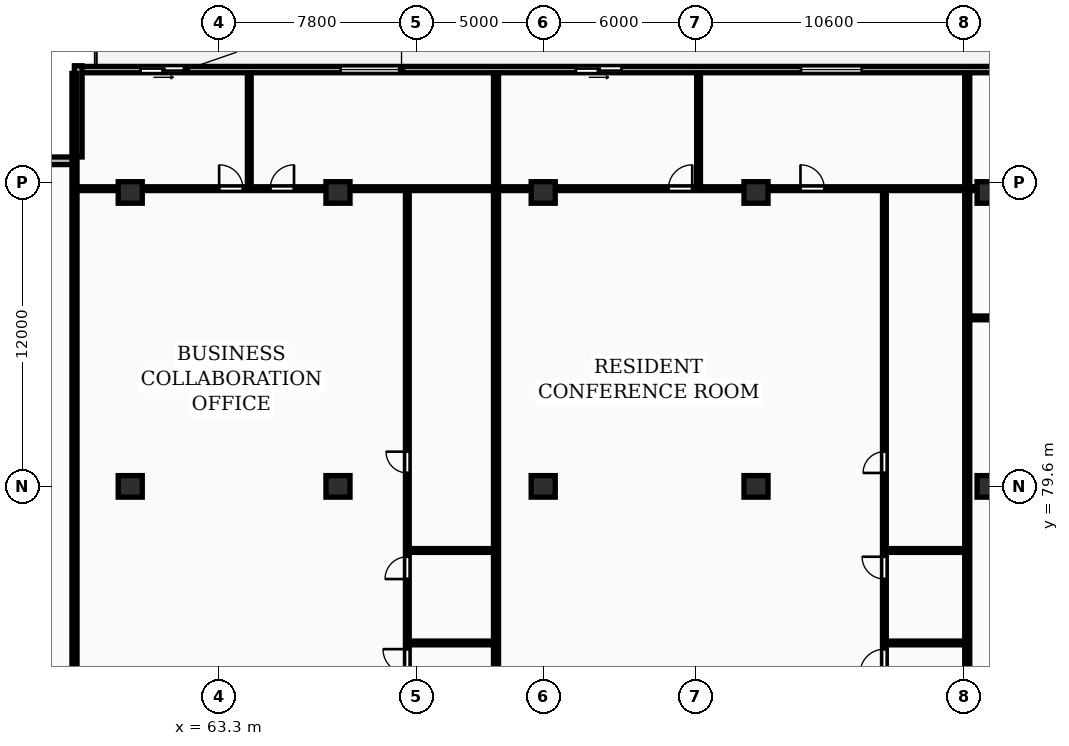
"""IFC4 building model, lengths in metres.
Left out: names, types, materials, properties, quantities, classifications, styles, units other than length and angle.
Written with IfcOpenShell. Run it as: python <this file> out.ifc"""

import sys

from ifc_helpers import new_model, si_unit, direction, frame, frame_2d, origin, origin_2d, place, context, subcontext, project, spatial, rectangle, extrude, element, fill, save


model = new_model("IFC4")
c1 = context("Model", 3, precision=1e-05, world=origin(), true_north=direction((0.0, 1.0)))
c2 = subcontext(c1, "Body", "Model", "MODEL_VIEW")
j1 = project(units=[si_unit("LENGTHUNIT", "METRE"), si_unit("PLANEANGLEUNIT", "RADIAN")], contexts=[c1])
p1 = place(None, origin())
s1 = spatial("IfcSite", under=j1, at=p1, CompositionType="ELEMENT")
p2 = place(p1, origin())
s2 = spatial("IfcBuilding", under=s1, at=p2, CompositionType="ELEMENT")
p3 = place(p2, frame((0.0, 0.0, 132.8)))
s3 = spatial("IfcBuildingStorey", under=s2, at=p3, CompositionType="ELEMENT", Elevation=132.8)
for number, where, z_axis, x_axis in (
    (1, (59.8, 79.6, 0.0), (0.0, 0.0, 1.0), (1.0, 0.0, 0.0)),
    (2, (59.8, 91.2, 0.0), (0.0, 0.0, 1.0), (1.0, 0.0, 0.0)),
    (3, (68.0, 79.6, 0.0), (0.0, 0.0, 1.0), (1.0, 0.0, 0.0)),
    (4, (68.0, 91.2, 0.0), (0.0, 0.0, 1.0), (1.0, 0.0, 0.0)),
    (5, (76.1, 79.6, 0.0), (0.0, 0.0, 1.0), (1.0, 0.0, 0.0)),
    (6, (76.1, 91.2, 0.0), (0.0, 0.0, 1.0), (1.0, 0.0, 0.0)),
    (7, (84.5, 79.6, 0.0), (0.0, 0.0, 1.0), (1.0, 0.0, 0.0)),
    (8, (84.5, 91.2, 0.0), (0.0, 0.0, 1.0), (1.0, 0.0, 0.0)),
    (9, (93.7, 79.6, 0.0), (0.0, 0.0, 1.0), (1.0, 0.0, 0.0)),
    (10, (93.7, 91.2, 0.0), (0.0, 0.0, 1.0), (1.0, 0.0, 0.0)),
):
    element("IfcColumn", number, at=place(p3, frame(where, z_axis=z_axis, x_axis=x_axis)), inside=s3, PredefinedType="COLUMN", context=c2, shape_type="SweptSolid", body=[
        extrude(rectangle(XDim=0.95, YDim=0.85, at=origin_2d()), origin(), (0.0, 0.0, 1.0), 3.25),
    ])
p4 = place(p3, frame((130.6, 96.05, 0.0), z_axis=(0.0, 0.0, 1.0), x_axis=(-1.0, 0.0, 0.0)))
e11 = element("IfcWall", 11, at=p4, inside=s3, PredefinedType="STANDARD", context=c2, shape_type="SweptSolid", body=[
    extrude(rectangle(XDim=73.0, YDim=0.25, at=frame_2d((36.5, 0.0))), origin(), (0.0, 0.0, 1.0), 2.97),
])
p5 = place(p4, frame((68.591, 0.0, 0.0)))
e12 = element("IfcOpeningElement", 12, at=p5, cuts=e11, PredefinedType="OPENING", context=c2, shape_type="SweptSolid", body=[
    extrude(rectangle(XDim=1.8, YDim=2.2, at=frame_2d((0.9, 1.1))), frame((0.0, 0.135, 0.0), z_axis=(0.0, -1.0, 0.0), x_axis=(1.0, 0.0, 0.0)), (0.0, 0.0, 1.0), 0.27),
])
p6 = place(p4, frame((60.092, 0.0, 0.85)))
e13 = element("IfcOpeningElement", 13, at=p6, cuts=e11, PredefinedType="OPENING", context=c2, shape_type="SweptSolid", body=[
    extrude(rectangle(XDim=2.4, YDim=1.9, at=frame_2d((1.2, 0.95))), frame((0.0, 0.135, 0.0), z_axis=(0.0, -1.0, 0.0), x_axis=(1.0, 0.0, 0.0)), (0.0, 0.0, 1.0), 0.27),
])
p7 = place(p4, frame((51.405, 0.0, 0.0)))
e14 = element("IfcOpeningElement", 14, at=p7, cuts=e11, PredefinedType="OPENING", context=c2, shape_type="SweptSolid", body=[
    extrude(rectangle(XDim=1.8, YDim=2.2, at=frame_2d((0.9, 1.1))), frame((0.0, 0.135, 0.0), z_axis=(0.0, -1.0, 0.0), x_axis=(1.0, 0.0, 0.0)), (0.0, 0.0, 1.0), 0.27),
])
p8 = place(p4, frame((41.925, 0.0, 0.85)))
e15 = element("IfcOpeningElement", 15, at=p8, cuts=e11, PredefinedType="OPENING", context=c2, shape_type="SweptSolid", body=[
    extrude(rectangle(XDim=2.4, YDim=1.9, at=frame_2d((1.2, 0.95))), frame((0.0, 0.135, 0.0), z_axis=(0.0, -1.0, 0.0), x_axis=(1.0, 0.0, 0.0)), (0.0, 0.0, 1.0), 0.27),
])
p9 = place(p4, frame((29.296, 0.0, 0.85)))
e16 = element("IfcOpeningElement", 16, at=p9, cuts=e11, PredefinedType="OPENING", context=c2, shape_type="SweptSolid", body=[
    extrude(rectangle(XDim=2.4, YDim=1.9, at=frame_2d((1.2, 0.95))), frame((0.0, 0.135, 0.0), z_axis=(0.0, -1.0, 0.0), x_axis=(1.0, 0.0, 0.0)), (0.0, 0.0, 1.0), 0.27),
])
p10 = place(p4, frame((23.502, 0.0, 0.85)))
e17 = element("IfcOpeningElement", 17, at=p10, cuts=e11, PredefinedType="OPENING", context=c2, shape_type="SweptSolid", body=[
    extrude(rectangle(XDim=2.4, YDim=1.9, at=frame_2d((1.2, 0.95))), frame((0.0, 0.135, 0.0), z_axis=(0.0, -1.0, 0.0), x_axis=(1.0, 0.0, 0.0)), (0.0, 0.0, 1.0), 0.27),
])
p11 = place(p4, frame((34.617, 0.0, 0.0)))
e18 = element("IfcOpeningElement", 18, at=p11, cuts=e11, PredefinedType="OPENING", context=c2, shape_type="SweptSolid", body=[
    extrude(rectangle(XDim=1.8, YDim=2.2, at=frame_2d((0.9, 1.1))), frame((0.0, 0.135, 0.0), z_axis=(0.0, -1.0, 0.0), x_axis=(1.0, 0.0, 0.0)), (0.0, 0.0, 1.0), 0.27),
])
p12 = place(p4, frame((18.5, 0.0, 0.85)))
e19 = element("IfcOpeningElement", 19, at=p12, cuts=e11, PredefinedType="OPENING", context=c2, shape_type="SweptSolid", body=[
    extrude(rectangle(XDim=2.4, YDim=1.9, at=frame_2d((1.2, 0.95))), frame((0.0, 0.135, 0.0), z_axis=(0.0, -1.0, 0.0), x_axis=(1.0, 0.0, 0.0)), (0.0, 0.0, 1.0), 0.27),
])
p13 = place(p4, frame((9.458, 0.0, 0.85)))
e20 = element("IfcOpeningElement", 20, at=p13, cuts=e11, PredefinedType="OPENING", context=c2, shape_type="SweptSolid", body=[
    extrude(rectangle(XDim=2.4, YDim=1.9, at=frame_2d((1.2, 0.95))), frame((0.0, 0.135, 0.0), z_axis=(0.0, -1.0, 0.0), x_axis=(1.0, 0.0, 0.0)), (0.0, 0.0, 1.0), 0.27),
])
p14 = place(p4, frame((5.695, 0.0, 0.85)))
e21 = element("IfcOpeningElement", 21, at=p14, cuts=e11, PredefinedType="OPENING", context=c2, shape_type="SweptSolid", body=[
    extrude(rectangle(XDim=1.8, YDim=1.8, at=frame_2d((0.9, 0.9))), frame((0.0, 0.135, 0.0), z_axis=(0.0, -1.0, 0.0), x_axis=(1.0, 0.0, 0.0)), (0.0, 0.0, 1.0), 0.27),
])
p15 = place(p4, frame((14.225, 0.0, 0.0)))
e22 = element("IfcOpeningElement", 22, at=p15, cuts=e11, PredefinedType="OPENING", context=c2, shape_type="SweptSolid", body=[
    extrude(rectangle(XDim=1.8, YDim=2.2, at=frame_2d((0.9, 1.1))), frame((0.0, 0.135, 0.0), z_axis=(0.0, -1.0, 0.0), x_axis=(1.0, 0.0, 0.0)), (0.0, 0.0, 1.0), 0.27),
])
p16 = place(p4, frame((1.245, 0.0, 0.85)))
e23 = element("IfcOpeningElement", 23, at=p16, cuts=e11, PredefinedType="OPENING", context=c2, shape_type="SweptSolid", body=[
    extrude(rectangle(XDim=2.4, YDim=1.9, at=frame_2d((1.2, 0.95))), frame((0.0, 0.135, 0.0), z_axis=(0.0, -1.0, 0.0), x_axis=(1.0, 0.0, 0.0)), (0.0, 0.0, 1.0), 0.27),
])
p17 = place(p3, frame((57.75, 96.2, 0.0), z_axis=(0.0, 0.0, 1.0), x_axis=(0.0, -1.0, 0.0)))
e24 = element("IfcWall", 24, at=p17, inside=s3, PredefinedType="STANDARD", context=c2, shape_type="SweptSolid", body=[
    extrude(rectangle(XDim=3.6, YDim=0.3, at=frame_2d((1.8, 0.0))), origin(), (0.0, 0.0, 1.0), 2.97),
])
p18 = place(p3, frame((57.6, 92.45, 0.0), z_axis=(0.0, 0.0, 1.0), x_axis=(-1.0, 0.0, 0.0)))
e25 = element("IfcWall", 25, at=p18, inside=s3, PredefinedType="STANDARD", context=c2, shape_type="SweptSolid", body=[
    extrude(rectangle(XDim=3.6, YDim=0.3, at=frame_2d((1.8, 0.0))), origin(), (0.0, 0.0, 1.0), 2.97),
])
for number, where, z_axis, x_axis in (
    (26, (57.6, 69.83, 0.0), (0.0, 0.0, 1.0), (0.0, 1.0, 0.0)),
    (27, (74.238, 69.83, 0.0), (0.0, 0.0, 1.0), (0.0, 1.0, 0.0)),
):
    element("IfcWall", number, at=place(p3, frame(where, z_axis=z_axis, x_axis=x_axis)), inside=s3, PredefinedType="PARTITIONING", context=c2, shape_type="SweptSolid", body=[
        extrude(rectangle(XDim=26.07, YDim=0.2, at=frame_2d((13.035, 0.0))), origin(), (0.0, 0.0, 1.0), 2.97),
    ])
for number, where, z_axis, x_axis in (
    (28, (70.798, 73.42, 0.0), (0.0, 0.0, 1.0), (1.0, 0.0, 0.0)),
    (29, (70.798, 77.07, 0.0), (0.0, 0.0, 1.0), (1.0, 0.0, 0.0)),
):
    element("IfcWall", number, at=place(p3, frame(where, z_axis=z_axis, x_axis=x_axis)), inside=s3, PredefinedType="PARTITIONING", context=c2, shape_type="SweptSolid", body=[
        extrude(rectangle(XDim=3.36, YDim=0.15, at=frame_2d((1.68, 0.0))), origin(), (0.0, 0.0, 1.0), 2.97),
    ])
p19 = place(p3, frame((70.738, 69.81, 0.0), z_axis=(0.0, 0.0, 1.0), x_axis=(0.0, 1.0, 0.0)))
e30 = element("IfcWall", 30, at=p19, inside=s3, PredefinedType="PARTITIONING", context=c2, shape_type="SweptSolid", body=[
    extrude(rectangle(XDim=21.48, YDim=0.15, at=frame_2d((10.74, 0.0))), origin(), (0.0, 0.0, 1.0), 2.97),
])
p20 = place(p19, frame((2.406, 0.0, 0.0)))
e31 = element("IfcOpeningElement", 31, at=p20, cuts=e30, PredefinedType="OPENING", context=c2, shape_type="SweptSolid", body=[
    extrude(rectangle(XDim=0.96, YDim=2.1, at=frame_2d((0.48, 1.05))), frame((0.0, 0.085, 0.0), z_axis=(0.0, -1.0, 0.0), x_axis=(1.0, 0.0, 0.0)), (0.0, 0.0, 1.0), 0.17),
])
p21 = place(p19, frame((6.133, 0.0, 0.0)))
e32 = element("IfcOpeningElement", 32, at=p21, cuts=e30, PredefinedType="OPENING", context=c2, shape_type="SweptSolid", body=[
    extrude(rectangle(XDim=0.88, YDim=2.06, at=frame_2d((0.44, 1.03))), frame((0.0, 0.085, 0.0), z_axis=(0.0, -1.0, 0.0), x_axis=(1.0, 0.0, 0.0)), (0.0, 0.0, 1.0), 0.17),
])
p22 = place(p19, frame((10.32, 0.0, 0.0)))
e33 = element("IfcOpeningElement", 33, at=p22, cuts=e30, PredefinedType="OPENING", context=c2, shape_type="SweptSolid", body=[
    extrude(rectangle(XDim=0.84, YDim=2.04, at=frame_2d((0.42, 1.02))), frame((0.0, 0.085, 0.0), z_axis=(0.0, -1.0, 0.0), x_axis=(1.0, 0.0, 0.0)), (0.0, 0.0, 1.0), 0.17),
])
p23 = place(p3, frame((64.499, 91.43, 0.0), z_axis=(0.0, 0.0, 1.0), x_axis=(0.0, 1.0, 0.0)))
e34 = element("IfcWall", 34, at=p23, inside=s3, PredefinedType="PARTITIONING", context=c2, shape_type="SweptSolid", body=[
    extrude(rectangle(XDim=4.47, YDim=0.15, at=frame_2d((2.235, 0.0))), origin(), (0.0, 0.0, 1.0), 2.97),
])
p24 = place(p3, frame((57.68, 91.35, 0.0), z_axis=(0.0, 0.0, 1.0), x_axis=(1.0, 0.0, 0.0)))
e35 = element("IfcWall", 35, at=p24, inside=s3, PredefinedType="PARTITIONING", context=c2, shape_type="SweptSolid", body=[
    extrude(rectangle(XDim=16.478, YDim=0.15, at=frame_2d((8.239, 0.0))), origin(), (0.0, 0.0, 1.0), 2.663),
])
p25 = place(p24, frame((5.629, 0.0, 0.0)))
e36 = element("IfcOpeningElement", 36, at=p25, cuts=e35, PredefinedType="OPENING", context=c2, shape_type="SweptSolid", body=[
    extrude(rectangle(XDim=0.94, YDim=2.1, at=frame_2d((0.47, 1.05))), frame((0.0, 0.085, 0.0), z_axis=(0.0, -1.0, 0.0), x_axis=(1.0, 0.0, 0.0)), (0.0, 0.0, 1.0), 0.17),
])
p26 = place(p24, frame((7.645, 0.0, 0.0)))
e37 = element("IfcOpeningElement", 37, at=p26, cuts=e35, PredefinedType="OPENING", context=c2, shape_type="SweptSolid", body=[
    extrude(rectangle(XDim=0.94, YDim=2.1, at=frame_2d((0.47, 1.05))), frame((0.0, 0.085, 0.0), z_axis=(0.0, -1.0, 0.0), x_axis=(1.0, 0.0, 0.0)), (0.0, 0.0, 1.0), 0.17),
])
p27 = place(p3, frame((92.837, 69.83, 0.0), z_axis=(0.0, 0.0, 1.0), x_axis=(0.0, 1.0, 0.0)))
e38 = element("IfcWall", 38, at=p27, inside=s3, PredefinedType="PARTITIONING", context=c2, shape_type="SweptSolid", body=[
    extrude(rectangle(XDim=26.07, YDim=0.2, at=frame_2d((13.035, 0.0))), origin(), (0.0, 0.0, 1.0), 2.97),
])
for number, where, z_axis, x_axis in (
    (39, (89.627, 73.42, 0.0), (0.0, 0.0, 1.0), (1.0, 0.0, 0.0)),
    (40, (89.627, 77.07, 0.0), (0.0, 0.0, 1.0), (1.0, 0.0, 0.0)),
):
    element("IfcWall", number, at=place(p3, frame(where, z_axis=z_axis, x_axis=x_axis)), inside=s3, PredefinedType="PARTITIONING", context=c2, shape_type="SweptSolid", body=[
        extrude(rectangle(XDim=3.13, YDim=0.15, at=frame_2d((1.565, 0.0))), origin(), (0.0, 0.0, 1.0), 2.97),
    ])
p28 = place(p3, frame((89.567, 69.81, 0.0), z_axis=(0.0, 0.0, 1.0), x_axis=(0.0, 1.0, 0.0)))
e41 = element("IfcWall", 41, at=p28, inside=s3, PredefinedType="PARTITIONING", context=c2, shape_type="SweptSolid", body=[
    extrude(rectangle(XDim=21.48, YDim=0.15, at=frame_2d((10.74, 0.0))), origin(), (0.0, 0.0, 1.0), 2.97),
])
p29 = place(p28, frame((2.406, 0.0, 0.0)))
e42 = element("IfcOpeningElement", 42, at=p29, cuts=e41, PredefinedType="OPENING", context=c2, shape_type="SweptSolid", body=[
    extrude(rectangle(XDim=0.96, YDim=2.1, at=frame_2d((0.48, 1.05))), frame((0.0, 0.085, 0.0), z_axis=(0.0, -1.0, 0.0), x_axis=(1.0, 0.0, 0.0)), (0.0, 0.0, 1.0), 0.17),
])
p30 = place(p28, frame((6.133, 0.0, 0.0)))
e43 = element("IfcOpeningElement", 43, at=p30, cuts=e41, PredefinedType="OPENING", context=c2, shape_type="SweptSolid", body=[
    extrude(rectangle(XDim=0.88, YDim=2.06, at=frame_2d((0.44, 1.03))), frame((0.0, 0.085, 0.0), z_axis=(0.0, -1.0, 0.0), x_axis=(1.0, 0.0, 0.0)), (0.0, 0.0, 1.0), 0.17),
])
p31 = place(p28, frame((10.32, 0.0, 0.0)))
e44 = element("IfcOpeningElement", 44, at=p31, cuts=e41, PredefinedType="OPENING", context=c2, shape_type="SweptSolid", body=[
    extrude(rectangle(XDim=0.84, YDim=2.04, at=frame_2d((0.42, 1.02))), frame((0.0, 0.085, 0.0), z_axis=(0.0, -1.0, 0.0), x_axis=(1.0, 0.0, 0.0)), (0.0, 0.0, 1.0), 0.17),
])
p32 = place(p3, frame((82.232, 91.43, 0.0), z_axis=(0.0, 0.0, 1.0), x_axis=(0.0, 1.0, 0.0)))
e45 = element("IfcWall", 45, at=p32, inside=s3, PredefinedType="PARTITIONING", context=c2, shape_type="SweptSolid", body=[
    extrude(rectangle(XDim=4.47, YDim=0.15, at=frame_2d((2.235, 0.0))), origin(), (0.0, 0.0, 1.0), 2.97),
])
p33 = place(p3, frame((74.317, 91.35, 0.0), z_axis=(0.0, 0.0, 1.0), x_axis=(1.0, 0.0, 0.0)))
e46 = element("IfcWall", 46, at=p33, inside=s3, PredefinedType="PARTITIONING", context=c2, shape_type="SweptSolid", body=[
    extrude(rectangle(XDim=18.44, YDim=0.15, at=frame_2d((9.22, 0.0))), origin(), (0.0, 0.0, 1.0), 2.663),
])
p34 = place(p33, frame((6.725, 0.0, 0.0)))
e47 = element("IfcOpeningElement", 47, at=p34, cuts=e46, PredefinedType="OPENING", context=c2, shape_type="SweptSolid", body=[
    extrude(rectangle(XDim=0.94, YDim=2.1, at=frame_2d((0.47, 1.05))), frame((0.0, 0.085, 0.0), z_axis=(0.0, -1.0, 0.0), x_axis=(1.0, 0.0, 0.0)), (0.0, 0.0, 1.0), 0.17),
])
p35 = place(p33, frame((11.938, 0.0, 0.0)))
e48 = element("IfcOpeningElement", 48, at=p35, cuts=e46, PredefinedType="OPENING", context=c2, shape_type="SweptSolid", body=[
    extrude(rectangle(XDim=0.94, YDim=2.1, at=frame_2d((0.47, 1.05))), frame((0.0, 0.085, 0.0), z_axis=(0.0, -1.0, 0.0), x_axis=(1.0, 0.0, 0.0)), (0.0, 0.0, 1.0), 0.17),
])
p36 = place(p3, frame((92.917, 86.25, 0.0), z_axis=(0.0, 0.0, 1.0), x_axis=(1.0, 0.0, 0.0)))
e49 = element("IfcWall", 49, at=p36, inside=s3, PredefinedType="PARTITIONING", context=c2, shape_type="SweptSolid", body=[
    extrude(rectangle(XDim=20.127, YDim=0.15, at=frame_2d((10.064, 0.0))), origin(), (0.0, 0.0, 1.0), 2.97),
])
p37 = place(p36, frame((2.72, 0.0, 0.0)))
e50 = element("IfcOpeningElement", 50, at=p37, cuts=e49, PredefinedType="OPENING", context=c2, shape_type="SweptSolid", body=[
    extrude(rectangle(XDim=0.92, YDim=2.08, at=frame_2d((0.46, 1.04))), frame((0.0, 0.085, 0.0), z_axis=(0.0, -1.0, 0.0), x_axis=(1.0, 0.0, 0.0)), (0.0, 0.0, 1.0), 0.17),
])
p38 = place(p3, frame((92.917, 91.35, 0.0), z_axis=(0.0, 0.0, 1.0), x_axis=(1.0, 0.0, 0.0)))
e51 = element("IfcWall", 51, at=p38, inside=s3, PredefinedType="PARTITIONING", context=c2, shape_type="SweptSolid", body=[
    extrude(rectangle(XDim=15.877, YDim=0.15, at=frame_2d((7.939, 0.0))), origin(), (0.0, 0.0, 1.0), 2.663),
])
p39 = place(p38, frame((3.1, 0.0, 0.0)))
e52 = element("IfcOpeningElement", 52, at=p39, cuts=e51, PredefinedType="OPENING", context=c2, shape_type="SweptSolid", body=[
    extrude(rectangle(XDim=0.94, YDim=2.1, at=frame_2d((0.47, 1.05))), frame((0.0, 0.085, 0.0), z_axis=(0.0, -1.0, 0.0), x_axis=(1.0, 0.0, 0.0)), (0.0, 0.0, 1.0), 0.17),
])
p40 = place(p38, frame((7.373, 0.0, 0.0)))
e53 = element("IfcOpeningElement", 53, at=p40, cuts=e51, PredefinedType="OPENING", context=c2, shape_type="SweptSolid", body=[
    extrude(rectangle(XDim=0.88, YDim=2.06, at=frame_2d((0.44, 1.03))), frame((0.0, 0.085, 0.0), z_axis=(0.0, -1.0, 0.0), x_axis=(1.0, 0.0, 0.0)), (0.0, 0.0, 1.0), 0.17),
])
p41 = place(p38, frame((11.646, 0.0, 0.0)))
e54 = element("IfcOpeningElement", 54, at=p41, cuts=e51, PredefinedType="OPENING", context=c2, shape_type="SweptSolid", body=[
    extrude(rectangle(XDim=0.88, YDim=2.06, at=frame_2d((0.44, 1.03))), frame((0.0, 0.085, 0.0), z_axis=(0.0, -1.0, 0.0), x_axis=(1.0, 0.0, 0.0)), (0.0, 0.0, 1.0), 0.17),
])
p42 = place(p5, origin())
e55 = element("IfcDoor", 55, at=p42, inside=s3, OperationType="SLIDING_TO_LEFT", PredefinedType="DOOR", context=c2, shape_type="SweptSolid", body=[
    extrude(rectangle(XDim=1.8, YDim=2.2, at=frame_2d((0.9, 1.1))), frame((0.0, 0.025, 0.0), z_axis=(0.0, -1.0, 0.0), x_axis=(1.0, 0.0, 0.0)), (0.0, 0.0, 1.0), 0.05),
])
fill(e12, e55)
p43 = place(p6, origin())
e56 = element("IfcWindow", 56, at=p43, inside=s3, PartitioningType="DOUBLE_PANEL_VERTICAL", PredefinedType="WINDOW", context=c2, shape_type="SweptSolid", body=[
    extrude(rectangle(XDim=2.4, YDim=1.9, at=frame_2d((1.2, 0.95))), frame((0.0, 0.03, 0.0), z_axis=(0.0, -1.0, 0.0), x_axis=(1.0, 0.0, 0.0)), (0.0, 0.0, 1.0), 0.06),
])
fill(e13, e56)
p44 = place(p7, origin())
e57 = element("IfcDoor", 57, at=p44, inside=s3, OperationType="SLIDING_TO_LEFT", PredefinedType="DOOR", context=c2, shape_type="SweptSolid", body=[
    extrude(rectangle(XDim=1.8, YDim=2.2, at=frame_2d((0.9, 1.1))), frame((0.0, 0.025, 0.0), z_axis=(0.0, -1.0, 0.0), x_axis=(1.0, 0.0, 0.0)), (0.0, 0.0, 1.0), 0.05),
])
fill(e14, e57)
p45 = place(p8, origin())
e58 = element("IfcWindow", 58, at=p45, inside=s3, PartitioningType="DOUBLE_PANEL_VERTICAL", PredefinedType="WINDOW", context=c2, shape_type="SweptSolid", body=[
    extrude(rectangle(XDim=2.4, YDim=1.9, at=frame_2d((1.2, 0.95))), frame((0.0, 0.03, 0.0), z_axis=(0.0, -1.0, 0.0), x_axis=(1.0, 0.0, 0.0)), (0.0, 0.0, 1.0), 0.06),
])
fill(e15, e58)
p46 = place(p20, origin())
e59 = element("IfcDoor", 59, at=p46, inside=s3, OperationType="SINGLE_SWING_RIGHT", PredefinedType="DOOR", context=c2, shape_type="SweptSolid", body=[
    extrude(rectangle(XDim=0.96, YDim=2.1, at=frame_2d((0.48, 1.05))), frame((0.0, 0.025, 0.0), z_axis=(0.0, -1.0, 0.0), x_axis=(1.0, 0.0, 0.0)), (0.0, 0.0, 1.0), 0.05),
])
fill(e31, e59)
p47 = place(p21, origin())
e60 = element("IfcDoor", 60, at=p47, inside=s3, OperationType="SINGLE_SWING_LEFT", PredefinedType="DOOR", context=c2, shape_type="SweptSolid", body=[
    extrude(rectangle(XDim=0.88, YDim=2.06, at=frame_2d((0.44, 1.03))), frame((0.0, 0.025, 0.0), z_axis=(0.0, -1.0, 0.0), x_axis=(1.0, 0.0, 0.0)), (0.0, 0.0, 1.0), 0.05),
])
fill(e32, e60)
p48 = place(p22, origin())
e61 = element("IfcDoor", 61, at=p48, inside=s3, OperationType="SINGLE_SWING_RIGHT", PredefinedType="DOOR", context=c2, shape_type="SweptSolid", body=[
    extrude(rectangle(XDim=0.84, YDim=2.04, at=frame_2d((0.42, 1.02))), frame((0.0, 0.025, 0.0), z_axis=(0.0, -1.0, 0.0), x_axis=(1.0, 0.0, 0.0)), (0.0, 0.0, 1.0), 0.05),
])
fill(e33, e61)
p49 = place(p25, origin())
e62 = element("IfcDoor", 62, at=p49, inside=s3, OperationType="SINGLE_SWING_LEFT", PredefinedType="DOOR", context=c2, shape_type="SweptSolid", body=[
    extrude(rectangle(XDim=0.94, YDim=2.1, at=frame_2d((0.47, 1.05))), frame((0.0, 0.025, 0.0), z_axis=(0.0, -1.0, 0.0), x_axis=(1.0, 0.0, 0.0)), (0.0, 0.0, 1.0), 0.05),
])
fill(e36, e62)
p50 = place(p26, origin())
e63 = element("IfcDoor", 63, at=p50, inside=s3, OperationType="SINGLE_SWING_RIGHT", PredefinedType="DOOR", context=c2, shape_type="SweptSolid", body=[
    extrude(rectangle(XDim=0.94, YDim=2.1, at=frame_2d((0.47, 1.05))), frame((0.0, 0.025, 0.0), z_axis=(0.0, -1.0, 0.0), x_axis=(1.0, 0.0, 0.0)), (0.0, 0.0, 1.0), 0.05),
])
fill(e37, e63)
p51 = place(p29, origin())
e64 = element("IfcDoor", 64, at=p51, inside=s3, OperationType="SINGLE_SWING_LEFT", PredefinedType="DOOR", context=c2, shape_type="SweptSolid", body=[
    extrude(rectangle(XDim=0.96, YDim=2.1, at=frame_2d((0.48, 1.05))), frame((0.0, 0.025, 0.0), z_axis=(0.0, -1.0, 0.0), x_axis=(1.0, 0.0, 0.0)), (0.0, 0.0, 1.0), 0.05),
])
fill(e42, e64)
p52 = place(p30, origin())
e65 = element("IfcDoor", 65, at=p52, inside=s3, OperationType="SINGLE_SWING_RIGHT", PredefinedType="DOOR", context=c2, shape_type="SweptSolid", body=[
    extrude(rectangle(XDim=0.88, YDim=2.06, at=frame_2d((0.44, 1.03))), frame((0.0, 0.025, 0.0), z_axis=(0.0, -1.0, 0.0), x_axis=(1.0, 0.0, 0.0)), (0.0, 0.0, 1.0), 0.05),
])
fill(e43, e65)
p53 = place(p31, origin())
e66 = element("IfcDoor", 66, at=p53, inside=s3, OperationType="SINGLE_SWING_LEFT", PredefinedType="DOOR", context=c2, shape_type="SweptSolid", body=[
    extrude(rectangle(XDim=0.84, YDim=2.04, at=frame_2d((0.42, 1.02))), frame((0.0, 0.025, 0.0), z_axis=(0.0, -1.0, 0.0), x_axis=(1.0, 0.0, 0.0)), (0.0, 0.0, 1.0), 0.05),
])
fill(e44, e66)
p54 = place(p34, origin())
e67 = element("IfcDoor", 67, at=p54, inside=s3, OperationType="SINGLE_SWING_RIGHT", PredefinedType="DOOR", context=c2, shape_type="SweptSolid", body=[
    extrude(rectangle(XDim=0.94, YDim=2.1, at=frame_2d((0.47, 1.05))), frame((0.0, 0.025, 0.0), z_axis=(0.0, -1.0, 0.0), x_axis=(1.0, 0.0, 0.0)), (0.0, 0.0, 1.0), 0.05),
])
fill(e47, e67)
p55 = place(p35, origin())
e68 = element("IfcDoor", 68, at=p55, inside=s3, OperationType="SINGLE_SWING_LEFT", PredefinedType="DOOR", context=c2, shape_type="SweptSolid", body=[
    extrude(rectangle(XDim=0.94, YDim=2.1, at=frame_2d((0.47, 1.05))), frame((0.0, 0.025, 0.0), z_axis=(0.0, -1.0, 0.0), x_axis=(1.0, 0.0, 0.0)), (0.0, 0.0, 1.0), 0.05),
])
fill(e48, e68)
save(model, sys.argv[1])
